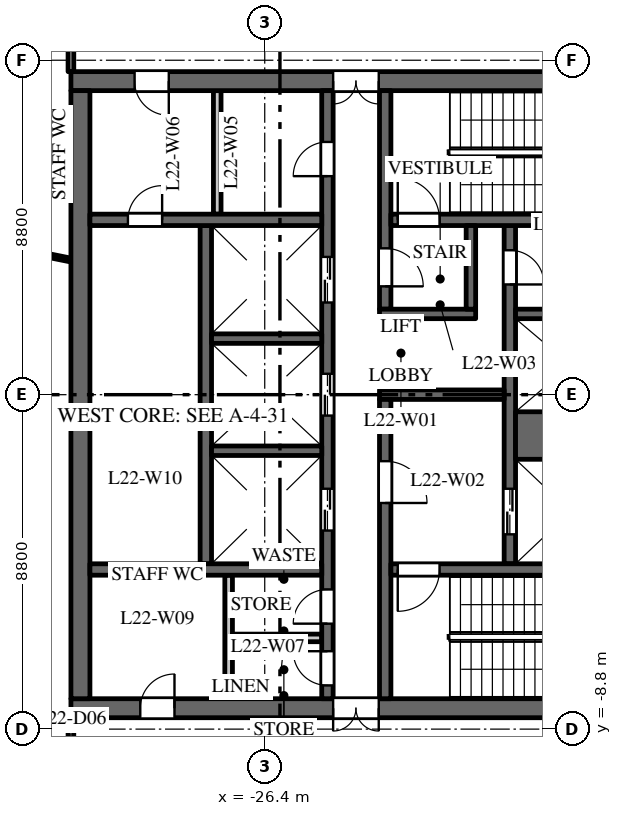
"""IFC4 building model, lengths in metres.
Left out: names, types, materials, properties, quantities, classifications, styles, units other than length and angle.
Written with IfcOpenShell. Run it as: python <this file> out.ifc"""

import sys

from ifc_helpers import new_model, si_unit, direction, frame, frame_2d, origin, place, context, subcontext, project, spatial, rectangle, extrude, element, fill, save


model = new_model("IFC4")
c1 = context("Model", 3, precision=1e-05, world=origin(), true_north=direction((0.0, 1.0)))
c2 = subcontext(c1, "Body", "Model", "MODEL_VIEW")
j1 = project(units=[si_unit("LENGTHUNIT", "METRE"), si_unit("PLANEANGLEUNIT", "RADIAN")], contexts=[c1])
p1 = place(None, origin())
s1 = spatial("IfcSite", under=j1, at=p1, CompositionType="ELEMENT")
p2 = place(p1, origin())
s2 = spatial("IfcBuilding", under=s1, at=p2, CompositionType="ELEMENT")
p3 = place(p2, frame((0.0, 0.0, 100.0)))
s3 = spatial("IfcBuildingStorey", under=s2, at=p3, CompositionType="ELEMENT", Elevation=100.0)
p4 = place(p3, frame((-16.5, 8.25, 0.0), z_axis=(0.0, 0.0, 1.0), x_axis=(-1.0, 0.0, 0.0)))
e1 = element("IfcWall", 1, at=p4, inside=s3, PredefinedType="SHEAR", context=c2, shape_type="SweptSolid", body=[
    extrude(rectangle(XDim=15.0, YDim=0.5, at=frame_2d((7.5, 0.0))), origin(), (0.0, 0.0, 1.0), 3.7),
])
p5 = place(p4, frame((6.9, 0.0, 0.0)))
e2 = element("IfcOpeningElement", 2, at=p5, cuts=e1, PredefinedType="OPENING", context=c2, shape_type="SweptSolid", body=[
    extrude(rectangle(XDim=1.2, YDim=2.1, at=frame_2d((0.6, 1.05))), frame((0.0, 0.26, 0.0), z_axis=(0.0, -1.0, 0.0), x_axis=(1.0, 0.0, 0.0)), (0.0, 0.0, 1.0), 0.52),
])
p6 = place(p4, frame((12.425, 0.0, 0.0)))
e3 = element("IfcOpeningElement", 3, at=p6, cuts=e1, PredefinedType="OPENING", context=c2, shape_type="SweptSolid", body=[
    extrude(rectangle(XDim=0.9, YDim=2.1, at=frame_2d((0.45, 1.05))), frame((0.0, 0.26, 0.0), z_axis=(0.0, -1.0, 0.0), x_axis=(1.0, 0.0, 0.0)), (0.0, 0.0, 1.0), 0.52),
])
p7 = place(p3, frame((-16.5, -8.25, 0.0), z_axis=(0.0, 0.0, 1.0), x_axis=(-1.0, 0.0, 0.0)))
e4 = element("IfcWall", 4, at=p7, inside=s3, PredefinedType="SHEAR", context=c2, shape_type="SweptSolid", body=[
    extrude(rectangle(XDim=15.0, YDim=0.5, at=frame_2d((7.5, 0.0))), origin(), (0.0, 0.0, 1.0), 3.7),
])
p8 = place(p7, frame((6.9, 0.0, 0.0)))
e5 = element("IfcOpeningElement", 5, at=p8, cuts=e4, PredefinedType="OPENING", context=c2, shape_type="SweptSolid", body=[
    extrude(rectangle(XDim=1.2, YDim=2.1, at=frame_2d((0.6, 1.05))), frame((0.0, 0.26, 0.0), z_axis=(0.0, -1.0, 0.0), x_axis=(1.0, 0.0, 0.0)), (0.0, 0.0, 1.0), 0.52),
])
p9 = place(p7, frame((12.275, 0.0, 0.0)))
e6 = element("IfcOpeningElement", 6, at=p9, cuts=e4, PredefinedType="OPENING", context=c2, shape_type="SweptSolid", body=[
    extrude(rectangle(XDim=0.9, YDim=2.1, at=frame_2d((0.45, 1.05))), frame((0.0, 0.26, 0.0), z_axis=(0.0, -1.0, 0.0), x_axis=(1.0, 0.0, 0.0)), (0.0, 0.0, 1.0), 0.52),
])
p10 = place(p3, frame((-27.95, -4.45, 0.0), z_axis=(0.0, 0.0, 1.0), x_axis=(0.0, 1.0, 0.0)))
e7 = element("IfcWall", 7, at=p10, inside=s3, PredefinedType="SHEAR", context=c2, shape_type="SweptSolid", body=[
    extrude(rectangle(XDim=8.9, YDim=0.3, at=frame_2d((4.45, 0.0))), origin(), (0.0, 0.0, 1.0), 3.7),
])
p11 = place(p3, frame((-19.95, -4.45, 0.0), z_axis=(0.0, 0.0, 1.0), x_axis=(0.0, 1.0, 0.0)))
e8 = element("IfcWall", 8, at=p11, inside=s3, PredefinedType="SHEAR", context=c2, shape_type="SweptSolid", body=[
    extrude(rectangle(XDim=8.9, YDim=0.3, at=frame_2d((4.45, 0.0))), origin(), (0.0, 0.0, 1.0), 3.7),
])
p12 = place(p11, frame((0.775, 0.0, 0.0)))
e9 = element("IfcOpeningElement", 9, at=p12, cuts=e8, PredefinedType="OPENING", context=c2, shape_type="SweptSolid", body=[
    extrude(rectangle(XDim=1.2, YDim=2.1, at=frame_2d((0.6, 1.05))), frame((0.0, 0.16, 0.0), z_axis=(0.0, -1.0, 0.0), x_axis=(1.0, 0.0, 0.0)), (0.0, 0.0, 1.0), 0.32),
])
p13 = place(p11, frame((7.35, 0.0, 0.0)))
e10 = element("IfcOpeningElement", 10, at=p13, cuts=e8, PredefinedType="OPENING", context=c2, shape_type="SweptSolid", body=[
    extrude(rectangle(XDim=0.9, YDim=2.1, at=frame_2d((0.45, 1.05))), frame((0.0, 0.16, 0.0), z_axis=(0.0, -1.0, 0.0), x_axis=(1.0, 0.0, 0.0)), (0.0, 0.0, 1.0), 0.32),
])
p14 = place(p3, frame((-24.75, -8.0, 0.0), z_axis=(0.0, 0.0, 1.0), x_axis=(0.0, 1.0, 0.0)))
e11 = element("IfcWall", 11, at=p14, inside=s3, PredefinedType="SHEAR", context=c2, shape_type="SweptSolid", body=[
    extrude(rectangle(XDim=16.0, YDim=0.3, at=frame_2d((8.0, 0.0))), origin(), (0.0, 0.0, 1.0), 3.7),
])
p15 = place(p14, frame((4.425, 0.0, 0.0)))
e12 = element("IfcOpeningElement", 12, at=p15, cuts=e11, PredefinedType="OPENING", context=c2, shape_type="SweptSolid", body=[
    extrude(rectangle(XDim=1.1, YDim=2.1, at=frame_2d((0.55, 1.05))), frame((0.0, 0.16, 0.0), z_axis=(0.0, -1.0, 0.0), x_axis=(1.0, 0.0, 0.0)), (0.0, 0.0, 1.0), 0.32),
])
p16 = place(p14, frame((7.45, 0.0, 0.0)))
e13 = element("IfcOpeningElement", 13, at=p16, cuts=e11, PredefinedType="OPENING", context=c2, shape_type="SweptSolid", body=[
    extrude(rectangle(XDim=1.1, YDim=2.1, at=frame_2d((0.55, 1.05))), frame((0.0, 0.16, 0.0), z_axis=(0.0, -1.0, 0.0), x_axis=(1.0, 0.0, 0.0)), (0.0, 0.0, 1.0), 0.32),
])
p17 = place(p14, frame((10.425, 0.0, 0.0)))
e14 = element("IfcOpeningElement", 14, at=p17, cuts=e11, PredefinedType="OPENING", context=c2, shape_type="SweptSolid", body=[
    extrude(rectangle(XDim=1.2, YDim=2.1, at=frame_2d((0.6, 1.05))), frame((0.0, 0.16, 0.0), z_axis=(0.0, -1.0, 0.0), x_axis=(1.0, 0.0, 0.0)), (0.0, 0.0, 1.0), 0.32),
])
p18 = place(p14, frame((13.75, 0.0, 0.0)))
e15 = element("IfcOpeningElement", 15, at=p18, cuts=e11, PredefinedType="OPENING", context=c2, shape_type="SweptSolid", body=[
    extrude(rectangle(XDim=0.9, YDim=2.1, at=frame_2d((0.45, 1.05))), frame((0.0, 0.16, 0.0), z_axis=(0.0, -1.0, 0.0), x_axis=(1.0, 0.0, 0.0)), (0.0, 0.0, 1.0), 0.32),
])
p19 = place(p14, frame((1.975, 0.0, 0.0)))
e16 = element("IfcOpeningElement", 16, at=p19, cuts=e11, PredefinedType="OPENING", context=c2, shape_type="SweptSolid", body=[
    extrude(rectangle(XDim=0.9, YDim=2.1, at=frame_2d((0.45, 1.05))), frame((0.0, 0.16, 0.0), z_axis=(0.0, -1.0, 0.0), x_axis=(1.0, 0.0, 0.0)), (0.0, 0.0, 1.0), 0.32),
])
p20 = place(p14, frame((0.35, 0.0, 0.0)))
e17 = element("IfcOpeningElement", 17, at=p20, cuts=e11, PredefinedType="OPENING", context=c2, shape_type="SweptSolid", body=[
    extrude(rectangle(XDim=0.9, YDim=2.1, at=frame_2d((0.45, 1.05))), frame((0.0, 0.16, 0.0), z_axis=(0.0, -1.0, 0.0), x_axis=(1.0, 0.0, 0.0)), (0.0, 0.0, 1.0), 0.32),
])
p21 = place(p3, frame((-20.1, 0.0, 0.0), z_axis=(0.0, 0.0, 1.0), x_axis=(-1.0, 0.0, 0.0)))
e18 = element("IfcWall", 18, at=p21, inside=s3, PredefinedType="SHEAR", context=c2, shape_type="SweptSolid", body=[
    extrude(rectangle(XDim=3.28, YDim=0.25, at=frame_2d((1.64, 0.0))), origin(), (0.0, 0.0, 1.0), 3.7),
])
p22 = place(p3, frame((-31.25, -8.0, 0.0), z_axis=(0.0, 0.0, 1.0), x_axis=(0.0, 1.0, 0.0)))
e19 = element("IfcWall", 19, at=p22, inside=s3, PredefinedType="SHEAR", context=c2, shape_type="SweptSolid", body=[
    extrude(rectangle(XDim=16.0, YDim=0.5, at=frame_2d((8.0, 0.0))), origin(), (0.0, 0.0, 1.0), 3.7),
])
p23 = place(p3, frame((-24.9, 4.6, 0.0), z_axis=(0.0, 0.0, 1.0), x_axis=(-1.0, 0.0, 0.0)))
e20 = element("IfcWall", 20, at=p23, inside=s3, PredefinedType="SHEAR", context=c2, shape_type="SweptSolid", body=[
    extrude(rectangle(XDim=6.1, YDim=0.3, at=frame_2d((3.05, 0.0))), origin(), (0.0, 0.0, 1.0), 3.7),
])
p24 = place(p23, frame((4.2, 0.0, 0.0)))
e21 = element("IfcOpeningElement", 21, at=p24, cuts=e20, PredefinedType="OPENING", context=c2, shape_type="SweptSolid", body=[
    extrude(rectangle(XDim=0.9, YDim=2.1, at=frame_2d((0.45, 1.05))), frame((0.0, 0.16, 0.0), z_axis=(0.0, -1.0, 0.0), x_axis=(1.0, 0.0, 0.0)), (0.0, 0.0, 1.0), 0.32),
])
for number, where, z_axis, x_axis in (
    (22, (-27.65, 4.75, 0.0), (0.0, 0.0, 1.0), (0.0, 1.0, 0.0)),
    (23, (-27.35, -8.0, 0.0), (0.0, 0.0, 1.0), (0.0, 1.0, 0.0)),
):
    element("IfcWall", number, at=place(p3, frame(where, z_axis=z_axis, x_axis=x_axis)), inside=s3, PredefinedType="PARTITIONING", context=c2, shape_type="SweptSolid", body=[
        extrude(rectangle(XDim=3.25, YDim=0.2, at=frame_2d((1.625, 0.0))), origin(), (0.0, 0.0, 1.0), 3.7),
    ])
p25 = place(p3, frame((-24.9, -6.4, 0.0), z_axis=(0.0, 0.0, 1.0), x_axis=(-1.0, 0.0, 0.0)))
e24 = element("IfcWall", 24, at=p25, inside=s3, PredefinedType="PARTITIONING", context=c2, shape_type="SweptSolid", body=[
    extrude(rectangle(XDim=2.35, YDim=0.2, at=frame_2d((1.175, 0.0))), origin(), (0.0, 0.0, 1.0), 3.7),
])
p26 = place(p3, frame((-24.9, -4.6, 0.0), z_axis=(0.0, 0.0, 1.0), x_axis=(-1.0, 0.0, 0.0)))
e25 = element("IfcWall", 25, at=p26, inside=s3, PredefinedType="SHEAR", context=c2, shape_type="SweptSolid", body=[
    extrude(rectangle(XDim=6.1, YDim=0.3, at=frame_2d((3.05, 0.0))), origin(), (0.0, 0.0, 1.0), 3.7),
])
p27 = place(p3, frame((-16.9, -1.075, 0.0), z_axis=(0.0, 0.0, 1.0), x_axis=(-1.0, 0.0, 0.0)))
e26 = element("IfcWall", 26, at=p27, inside=s3, PredefinedType="SHEAR", context=c2, shape_type="SweptSolid", body=[
    extrude(rectangle(XDim=2.9, YDim=1.25, at=frame_2d((1.45, 0.0))), origin(), (0.0, 0.0, 1.0), 3.7),
])
for number, where, z_axis, x_axis in (
    (27, (-16.9, 2.125, 0.0), (0.0, 0.0, 1.0), (-1.0, 0.0, 0.0)),
    (28, (-24.9, -1.475, 0.0), (0.0, 0.0, 1.0), (-1.0, 0.0, 0.0)),
    (29, (-24.9, 1.475, 0.0), (0.0, 0.0, 1.0), (-1.0, 0.0, 0.0)),
):
    element("IfcWall", number, at=place(p3, frame(where, z_axis=z_axis, x_axis=x_axis)), inside=s3, PredefinedType="SHEAR", context=c2, shape_type="SweptSolid", body=[
        extrude(rectangle(XDim=2.9, YDim=0.25, at=frame_2d((1.45, 0.0))), origin(), (0.0, 0.0, 1.0), 3.7),
    ])
p28 = place(p3, frame((-23.23, 2.25, 0.0), z_axis=(0.0, 0.0, 1.0), x_axis=(0.0, 1.0, 0.0)))
e30 = element("IfcWall", 30, at=p28, inside=s3, PredefinedType="SHEAR", context=c2, shape_type="SweptSolid", body=[
    extrude(rectangle(XDim=5.75, YDim=0.3, at=frame_2d((2.875, 0.0))), origin(), (0.0, 0.0, 1.0), 3.7),
])
p29 = place(p28, frame((0.6, 0.0, 0.0)))
e31 = element("IfcOpeningElement", 31, at=p29, cuts=e30, PredefinedType="OPENING", context=c2, shape_type="SweptSolid", body=[
    extrude(rectangle(XDim=1.0, YDim=2.1, at=frame_2d((0.5, 1.05))), frame((0.0, 0.16, 0.0), z_axis=(0.0, -1.0, 0.0), x_axis=(1.0, 0.0, 0.0)), (0.0, 0.0, 1.0), 0.32),
])
p30 = place(p3, frame((-23.23, -8.0, 0.0), z_axis=(0.0, 0.0, 1.0), x_axis=(0.0, 1.0, 0.0)))
e32 = element("IfcWall", 32, at=p30, inside=s3, PredefinedType="SHEAR", context=c2, shape_type="SweptSolid", body=[
    extrude(rectangle(XDim=7.875, YDim=0.3, at=frame_2d((3.938, 0.0))), origin(), (0.0, 0.0, 1.0), 3.7),
])
p31 = place(p30, frame((5.15, 0.0, 0.0)))
e33 = element("IfcOpeningElement", 33, at=p31, cuts=e32, PredefinedType="OPENING", context=c2, shape_type="SweptSolid", body=[
    extrude(rectangle(XDim=1.1, YDim=2.1, at=frame_2d((0.55, 1.05))), frame((0.0, 0.16, 0.0), z_axis=(0.0, -1.0, 0.0), x_axis=(1.0, 0.0, 0.0)), (0.0, 0.0, 1.0), 0.32),
])
p32 = place(p3, frame((-16.9, 4.6, 0.0), z_axis=(0.0, 0.0, 1.0), x_axis=(-1.0, 0.0, 0.0)))
e34 = element("IfcWall", 34, at=p32, inside=s3, PredefinedType="SHEAR", context=c2, shape_type="SweptSolid", body=[
    extrude(rectangle(XDim=6.18, YDim=0.3, at=frame_2d((3.09, 0.0))), origin(), (0.0, 0.0, 1.0), 3.7),
])
p33 = place(p32, frame((4.9, 0.0, 0.0)))
e35 = element("IfcOpeningElement", 35, at=p33, cuts=e34, PredefinedType="OPENING", context=c2, shape_type="SweptSolid", body=[
    extrude(rectangle(XDim=1.1, YDim=2.1, at=frame_2d((0.55, 1.05))), frame((0.0, 0.16, 0.0), z_axis=(0.0, -1.0, 0.0), x_axis=(1.0, 0.0, 0.0)), (0.0, 0.0, 1.0), 0.32),
])
p34 = place(p3, frame((-16.9, -4.6, 0.0), z_axis=(0.0, 0.0, 1.0), x_axis=(-1.0, 0.0, 0.0)))
e36 = element("IfcWall", 36, at=p34, inside=s3, PredefinedType="SHEAR", context=c2, shape_type="SweptSolid", body=[
    extrude(rectangle(XDim=6.18, YDim=0.3, at=frame_2d((3.09, 0.0))), origin(), (0.0, 0.0, 1.0), 3.7),
])
p35 = place(p34, frame((4.9, 0.0, 0.0)))
e37 = element("IfcOpeningElement", 37, at=p35, cuts=e36, PredefinedType="OPENING", context=c2, shape_type="SweptSolid", body=[
    extrude(rectangle(XDim=1.1, YDim=2.1, at=frame_2d((0.55, 1.05))), frame((0.0, 0.16, 0.0), z_axis=(0.0, -1.0, 0.0), x_axis=(1.0, 0.0, 0.0)), (0.0, 0.0, 1.0), 0.32),
])
p36 = place(p3, frame((-20.85, 2.125, 0.0), z_axis=(0.0, 0.0, 1.0), x_axis=(-1.0, 0.0, 0.0)))
e38 = element("IfcWall", 38, at=p36, inside=s3, PredefinedType="SHEAR", context=c2, shape_type="SweptSolid", body=[
    extrude(rectangle(XDim=2.53, YDim=0.25, at=frame_2d((1.265, 0.0))), origin(), (0.0, 0.0, 1.0), 3.7),
])
p37 = place(p3, frame((-20.975, 2.25, 0.0), z_axis=(0.0, 0.0, 1.0), x_axis=(0.0, 1.0, 0.0)))
e39 = element("IfcWall", 39, at=p37, inside=s3, PredefinedType="SHEAR", context=c2, shape_type="SweptSolid", body=[
    extrude(rectangle(XDim=2.2, YDim=0.25, at=frame_2d((1.1, 0.0))), origin(), (0.0, 0.0, 1.0), 3.7),
])
p38 = place(p3, frame((-35.512, 4.349, 0.0), z_axis=(0.0, 0.0, 1.0), x_axis=(0.980357474535, -0.197228857227, 0.0)))
e40 = element("IfcWall", 40, at=p38, inside=s3, PredefinedType="PARTITIONING", context=c2, shape_type="SweptSolid", body=[
    extrude(rectangle(XDim=4.092, YDim=0.1, at=frame_2d((2.046, 0.0))), origin(), (0.0, 0.0, 1.0), 3.2),
])
p39 = place(p3, frame((-31.5, -10.7, 0.0), z_axis=(0.0, 0.0, 1.0), x_axis=(0.0, 1.0, 0.0)))
e41 = element("IfcWall", 41, at=p39, inside=s3, PredefinedType="PARTITIONING", context=c2, shape_type="SweptSolid", body=[
    extrude(rectangle(XDim=2.2, YDim=0.15, at=frame_2d((1.1, 0.0))), origin(), (0.0, 0.0, 1.0), 3.7),
])
p40 = place(p39, frame((0.55, 0.0, 0.0)))
e42 = element("IfcOpeningElement", 42, at=p40, cuts=e41, PredefinedType="OPENING", context=c2, shape_type="SweptSolid", body=[
    extrude(rectangle(XDim=1.0, YDim=2.1, at=frame_2d((0.5, 1.05))), frame((0.0, 0.085, 0.0), z_axis=(0.0, -1.0, 0.0), x_axis=(1.0, 0.0, 0.0)), (0.0, 0.0, 1.0), 0.17),
])
p41 = place(p3, frame((-31.5, 8.5, 0.0), z_axis=(0.0, 0.0, 1.0), x_axis=(0.0, 1.0, 0.0)))
e43 = element("IfcWall", 43, at=p41, inside=s3, PredefinedType="PARTITIONING", context=c2, shape_type="SweptSolid", body=[
    extrude(rectangle(XDim=2.2, YDim=0.15, at=frame_2d((1.1, 0.0))), origin(), (0.0, 0.0, 1.0), 3.7),
])
p42 = place(p12, origin())
e44 = element("IfcDoor", 44, at=p42, inside=s3, OperationType="DOUBLE_DOOR_SLIDING", PredefinedType="DOOR", context=c2, shape_type="SweptSolid", body=[
    extrude(rectangle(XDim=1.2, YDim=2.1, at=frame_2d((0.6, 1.05))), frame((0.0, 0.025, 0.0), z_axis=(0.0, -1.0, 0.0), x_axis=(1.0, 0.0, 0.0)), (0.0, 0.0, 1.0), 0.05),
])
fill(e9, e44)
p43 = place(p15, origin())
e45 = element("IfcDoor", 45, at=p43, inside=s3, OperationType="DOUBLE_DOOR_SLIDING", PredefinedType="DOOR", context=c2, shape_type="SweptSolid", body=[
    extrude(rectangle(XDim=1.1, YDim=2.1, at=frame_2d((0.55, 1.05))), frame((0.0, 0.025, 0.0), z_axis=(0.0, -1.0, 0.0), x_axis=(1.0, 0.0, 0.0)), (0.0, 0.0, 1.0), 0.05),
])
fill(e12, e45)
p44 = place(p16, origin())
e46 = element("IfcDoor", 46, at=p44, inside=s3, OperationType="DOUBLE_DOOR_SLIDING", PredefinedType="DOOR", context=c2, shape_type="SweptSolid", body=[
    extrude(rectangle(XDim=1.1, YDim=2.1, at=frame_2d((0.55, 1.05))), frame((0.0, 0.025, 0.0), z_axis=(0.0, -1.0, 0.0), x_axis=(1.0, 0.0, 0.0)), (0.0, 0.0, 1.0), 0.05),
])
fill(e13, e46)
p45 = place(p17, origin())
e47 = element("IfcDoor", 47, at=p45, inside=s3, OperationType="DOUBLE_DOOR_SLIDING", PredefinedType="DOOR", context=c2, shape_type="SweptSolid", body=[
    extrude(rectangle(XDim=1.2, YDim=2.1, at=frame_2d((0.6, 1.05))), frame((0.0, 0.025, 0.0), z_axis=(0.0, -1.0, 0.0), x_axis=(1.0, 0.0, 0.0)), (0.0, 0.0, 1.0), 0.05),
])
fill(e14, e47)
p46 = place(p33, origin())
e48 = element("IfcDoor", 48, at=p46, inside=s3, OperationType="SINGLE_SWING_RIGHT", PredefinedType="DOOR", context=c2, shape_type="SweptSolid", body=[
    extrude(rectangle(XDim=1.1, YDim=2.1, at=frame_2d((0.55, 1.05))), frame((0.0, 0.025, 0.0), z_axis=(0.0, -1.0, 0.0), x_axis=(1.0, 0.0, 0.0)), (0.0, 0.0, 1.0), 0.05),
])
fill(e35, e48)
p47 = place(p35, origin())
e49 = element("IfcDoor", 49, at=p47, inside=s3, OperationType="SINGLE_SWING_LEFT", PredefinedType="DOOR", context=c2, shape_type="SweptSolid", body=[
    extrude(rectangle(XDim=1.1, YDim=2.1, at=frame_2d((0.55, 1.05))), frame((0.0, 0.025, 0.0), z_axis=(0.0, -1.0, 0.0), x_axis=(1.0, 0.0, 0.0)), (0.0, 0.0, 1.0), 0.05),
])
fill(e37, e49)
p48 = place(p31, origin())
e50 = element("IfcDoor", 50, at=p48, inside=s3, OperationType="SINGLE_SWING_LEFT", PredefinedType="DOOR", context=c2, shape_type="SweptSolid", body=[
    extrude(rectangle(XDim=1.1, YDim=2.1, at=frame_2d((0.55, 1.05))), frame((0.0, 0.025, 0.0), z_axis=(0.0, -1.0, 0.0), x_axis=(1.0, 0.0, 0.0)), (0.0, 0.0, 1.0), 0.05),
])
fill(e33, e50)
p49 = place(p29, origin())
e51 = element("IfcDoor", 51, at=p49, inside=s3, OperationType="SINGLE_SWING_LEFT", PredefinedType="DOOR", context=c2, shape_type="SweptSolid", body=[
    extrude(rectangle(XDim=1.0, YDim=2.1, at=frame_2d((0.5, 1.05))), frame((0.0, 0.025, 0.0), z_axis=(0.0, -1.0, 0.0), x_axis=(1.0, 0.0, 0.0)), (0.0, 0.0, 1.0), 0.05),
])
fill(e31, e51)
p50 = place(p5, origin())
e52 = element("IfcDoor", 52, at=p50, inside=s3, OperationType="DOUBLE_DOOR_DOUBLE_SWING", PredefinedType="DOOR", context=c2, shape_type="SweptSolid", body=[
    extrude(rectangle(XDim=1.2, YDim=2.1, at=frame_2d((0.6, 1.05))), frame((0.0, 0.025, 0.0), z_axis=(0.0, -1.0, 0.0), x_axis=(1.0, 0.0, 0.0)), (0.0, 0.0, 1.0), 0.05),
])
fill(e2, e52)
p51 = place(p8, origin())
e53 = element("IfcDoor", 53, at=p51, inside=s3, OperationType="DOUBLE_DOOR_DOUBLE_SWING", PredefinedType="DOOR", context=c2, shape_type="SweptSolid", body=[
    extrude(rectangle(XDim=1.2, YDim=2.1, at=frame_2d((0.6, 1.05))), frame((0.0, 0.025, 0.0), z_axis=(0.0, -1.0, 0.0), x_axis=(1.0, 0.0, 0.0)), (0.0, 0.0, 1.0), 0.05),
])
fill(e5, e53)
p52 = place(p13, origin())
e54 = element("IfcDoor", 54, at=p52, inside=s3, OperationType="SINGLE_SWING_LEFT", PredefinedType="DOOR", context=c2, shape_type="SweptSolid", body=[
    extrude(rectangle(XDim=0.9, YDim=2.1, at=frame_2d((0.45, 1.05))), frame((0.0, 0.025, 0.0), z_axis=(0.0, -1.0, 0.0), x_axis=(1.0, 0.0, 0.0)), (0.0, 0.0, 1.0), 0.05),
])
fill(e10, e54)
p53 = place(p18, origin())
e55 = element("IfcDoor", 55, at=p53, inside=s3, OperationType="SINGLE_SWING_RIGHT", PredefinedType="DOOR", context=c2, shape_type="SweptSolid", body=[
    extrude(rectangle(XDim=0.9, YDim=2.1, at=frame_2d((0.45, 1.05))), frame((0.0, 0.025, 0.0), z_axis=(0.0, -1.0, 0.0), x_axis=(1.0, 0.0, 0.0)), (0.0, 0.0, 1.0), 0.05),
])
fill(e15, e55)
p54 = place(p6, origin())
e56 = element("IfcDoor", 56, at=p54, inside=s3, OperationType="SINGLE_SWING_RIGHT", PredefinedType="DOOR", context=c2, shape_type="SweptSolid", body=[
    extrude(rectangle(XDim=0.9, YDim=2.1, at=frame_2d((0.45, 1.05))), frame((0.0, 0.025, 0.0), z_axis=(0.0, -1.0, 0.0), x_axis=(1.0, 0.0, 0.0)), (0.0, 0.0, 1.0), 0.05),
])
fill(e3, e56)
p55 = place(p19, origin())
e57 = element("IfcDoor", 57, at=p55, inside=s3, OperationType="SINGLE_SWING_RIGHT", PredefinedType="DOOR", context=c2, shape_type="SweptSolid", body=[
    extrude(rectangle(XDim=0.9, YDim=2.1, at=frame_2d((0.45, 1.05))), frame((0.0, 0.025, 0.0), z_axis=(0.0, -1.0, 0.0), x_axis=(1.0, 0.0, 0.0)), (0.0, 0.0, 1.0), 0.05),
])
fill(e16, e57)
p56 = place(p20, origin())
e58 = element("IfcDoor", 58, at=p56, inside=s3, OperationType="SINGLE_SWING_LEFT", PredefinedType="DOOR", context=c2, shape_type="SweptSolid", body=[
    extrude(rectangle(XDim=0.9, YDim=2.1, at=frame_2d((0.45, 1.05))), frame((0.0, 0.025, 0.0), z_axis=(0.0, -1.0, 0.0), x_axis=(1.0, 0.0, 0.0)), (0.0, 0.0, 1.0), 0.05),
])
fill(e17, e58)
p57 = place(p9, origin())
e59 = element("IfcDoor", 59, at=p57, inside=s3, OperationType="SINGLE_SWING_LEFT", PredefinedType="DOOR", context=c2, shape_type="SweptSolid", body=[
    extrude(rectangle(XDim=0.9, YDim=2.1, at=frame_2d((0.45, 1.05))), frame((0.0, 0.025, 0.0), z_axis=(0.0, -1.0, 0.0), x_axis=(1.0, 0.0, 0.0)), (0.0, 0.0, 1.0), 0.05),
])
fill(e6, e59)
p58 = place(p24, origin())
e60 = element("IfcDoor", 60, at=p58, inside=s3, OperationType="SINGLE_SWING_LEFT", PredefinedType="DOOR", context=c2, shape_type="SweptSolid", body=[
    extrude(rectangle(XDim=0.9, YDim=2.1, at=frame_2d((0.45, 1.05))), frame((0.0, 0.025, 0.0), z_axis=(0.0, -1.0, 0.0), x_axis=(1.0, 0.0, 0.0)), (0.0, 0.0, 1.0), 0.05),
])
fill(e21, e60)
save(model, sys.argv[1])
